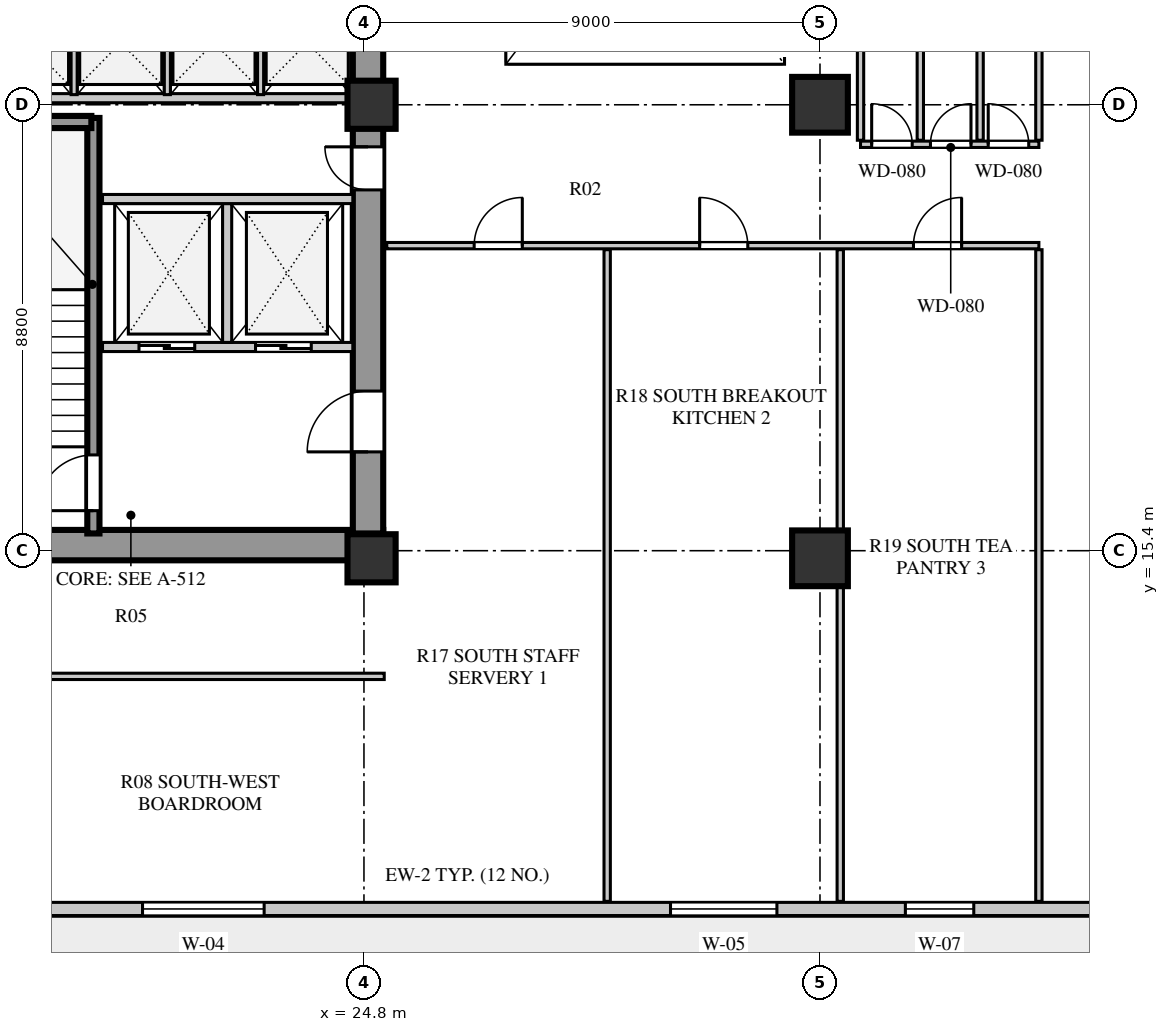
"""IFC4 building model, lengths in metres.
Left out: names, types, materials, properties, quantities, classifications, styles, units other than length and angle.
Written with IfcOpenShell. Run it as: python <this file> out.ifc"""

import sys

from ifc_helpers import new_model, si_unit, direction, frame, frame_2d, origin, origin_2d, place, context, subcontext, project, spatial, rectangle, extrude, element, fill, save


model = new_model("IFC4")
c1 = context("Model", 3, precision=1e-05, world=origin(), true_north=direction((0.0, 1.0)))
c2 = subcontext(c1, "Body", "Model", "MODEL_VIEW")
j1 = project(units=[si_unit("LENGTHUNIT", "METRE"), si_unit("PLANEANGLEUNIT", "RADIAN")], contexts=[c1])
p1 = place(None, origin())
s1 = spatial("IfcSite", under=j1, at=p1, CompositionType="ELEMENT")
p2 = place(p1, origin())
s2 = spatial("IfcBuilding", under=s1, at=p2, CompositionType="ELEMENT")
p3 = place(p2, frame((0.0, 0.0, 90.0)))
s3 = spatial("IfcBuildingStorey", under=s2, at=p3, CompositionType="ELEMENT", Elevation=90.0)
p4 = place(p3, frame((15.3, 15.51, 0.0), z_axis=(0.0, 0.0, 1.0), x_axis=(1.0, 0.0, 0.0)))
e1 = element("IfcWall", 1, at=p4, inside=s3, PredefinedType="SHEAR", context=c2, shape_type="SweptSolid", body=[
    extrude(rectangle(XDim=9.88, YDim=0.6, at=frame_2d((4.94, 0.0))), origin(), (0.0, 0.0, 1.0), 3.7),
])
p5 = place(p3, frame((24.88, 15.74, 0.0), z_axis=(0.0, 0.0, 1.0), x_axis=(0.0, 1.0, 0.0)))
e2 = element("IfcWall", 2, at=p5, inside=s3, PredefinedType="SHEAR", context=c2, shape_type="SweptSolid", body=[
    extrude(rectangle(XDim=25.76, YDim=0.6, at=frame_2d((12.88, 0.0))), origin(), (0.0, 0.0, 1.0), 3.7),
])
p6 = place(p5, frame((1.61, 0.0, 0.0)))
e3 = element("IfcOpeningElement", 3, at=p6, cuts=e2, PredefinedType="OPENING", context=c2, shape_type="SweptSolid", body=[
    extrude(rectangle(XDim=1.2, YDim=2.1, at=frame_2d((0.6, 1.05))), frame((0.0, 0.31, 0.0), z_axis=(0.0, -1.0, 0.0), x_axis=(1.0, 0.0, 0.0)), (0.0, 0.0, 1.0), 0.62),
])
p7 = place(p5, frame((6.78, 0.0, 0.0)))
e4 = element("IfcOpeningElement", 4, at=p7, cuts=e2, PredefinedType="OPENING", context=c2, shape_type="SweptSolid", body=[
    extrude(rectangle(XDim=0.85, YDim=2.06, at=frame_2d((0.425, 1.03))), frame((0.0, 0.31, 0.0), z_axis=(0.0, -1.0, 0.0), x_axis=(1.0, 0.0, 0.0)), (0.0, 0.0, 1.0), 0.62),
])
p8 = place(p5, frame((12.11, 0.0, 0.0)))
e5 = element("IfcOpeningElement", 5, at=p8, cuts=e2, PredefinedType="OPENING", context=c2, shape_type="SweptSolid", body=[
    extrude(rectangle(XDim=1.5, YDim=2.12, at=frame_2d((0.75, 1.06))), frame((0.0, 0.31, 0.0), z_axis=(0.0, -1.0, 0.0), x_axis=(1.0, 0.0, 0.0)), (0.0, 0.0, 1.0), 0.62),
])
p9 = place(p5, frame((20.11, 0.0, 0.0)))
e6 = element("IfcOpeningElement", 6, at=p9, cuts=e2, PredefinedType="OPENING", context=c2, shape_type="SweptSolid", body=[
    extrude(rectangle(XDim=1.2, YDim=2.12, at=frame_2d((0.6, 1.06))), frame((0.0, 0.31, 0.0), z_axis=(0.0, -1.0, 0.0), x_axis=(1.0, 0.0, 0.0)), (0.0, 0.0, 1.0), 0.62),
])
p10 = place(p5, frame((24.01, 0.0, 0.0)))
e7 = element("IfcOpeningElement", 7, at=p10, cuts=e2, PredefinedType="OPENING", context=c2, shape_type="SweptSolid", body=[
    extrude(rectangle(XDim=0.95, YDim=2.1, at=frame_2d((0.475, 1.05))), frame((0.0, 0.31, 0.0), z_axis=(0.0, -1.0, 0.0), x_axis=(1.0, 0.0, 0.0)), (0.0, 0.0, 1.0), 0.62),
])
for number, where, z_axis, x_axis in (
    (8, (24.95, 15.25, 0.0), (0.0, 0.0, 1.0), (1.0, 0.0, 0.0)),
    (9, (24.95, 24.2, 0.0), (0.0, 0.0, 1.0), (1.0, 0.0, 0.0)),
):
    element("IfcColumn", number, at=place(p3, frame(where, z_axis=z_axis, x_axis=x_axis)), inside=s3, PredefinedType="COLUMN", context=c2, shape_type="SweptSolid", body=[
        extrude(rectangle(XDim=0.95, YDim=0.95, at=origin_2d()), origin(), (0.0, 0.0, 1.0), 3.7),
    ])
for number, where, z_axis, x_axis in (
    (10, (33.8, 15.25, 0.0), (0.0, 0.0, 1.0), (1.0, 0.0, 0.0)),
    (11, (33.8, 24.2, 0.0), (0.0, 0.0, 1.0), (1.0, 0.0, 0.0)),
):
    element("IfcColumn", number, at=place(p3, frame(where, z_axis=z_axis, x_axis=x_axis)), inside=s3, PredefinedType="COLUMN", context=c2, shape_type="SweptSolid", body=[
        extrude(rectangle(XDim=1.1, YDim=1.1, at=origin_2d()), origin(), (0.0, 0.0, 1.0), 3.7),
    ])
p11 = place(p3, frame((12.0, 8.33, 0.0), z_axis=(0.0, 0.0, 1.0), x_axis=(1.0, 0.0, 0.0)))
e12 = element("IfcWall", 12, at=p11, inside=s3, PredefinedType="SOLIDWALL", context=c2, shape_type="SweptSolid", body=[
    extrude(rectangle(XDim=34.6, YDim=0.26, at=frame_2d((17.3, 0.0))), origin(), (0.0, 0.0, 1.0), 3.7),
])
p12 = place(p11, frame((0.95, 0.0, 0.0)))
e13 = element("IfcOpeningElement", 13, at=p12, cuts=e12, PredefinedType="OPENING", context=c2, shape_type="SweptSolid", body=[
    extrude(rectangle(XDim=1.0, YDim=2.05, at=frame_2d((0.5, 1.025))), frame((0.0, 0.14, 0.0), z_axis=(0.0, -1.0, 0.0), x_axis=(1.0, 0.0, 0.0)), (0.0, 0.0, 1.0), 0.28),
])
p13 = place(p11, frame((8.43, 0.0, 0.8)))
e14 = element("IfcOpeningElement", 14, at=p13, cuts=e12, PredefinedType="OPENING", context=c2, shape_type="SweptSolid", body=[
    extrude(rectangle(XDim=2.4, YDim=2.05, at=frame_2d((1.2, 1.025))), frame((0.0, 0.14, 0.0), z_axis=(0.0, -1.0, 0.0), x_axis=(1.0, 0.0, 0.0)), (0.0, 0.0, 1.0), 0.28),
])
p14 = place(p11, frame((18.85, 0.0, 0.8)))
e15 = element("IfcOpeningElement", 15, at=p14, cuts=e12, PredefinedType="OPENING", context=c2, shape_type="SweptSolid", body=[
    extrude(rectangle(XDim=2.1, YDim=1.95, at=frame_2d((1.05, 0.975))), frame((0.0, 0.14, 0.0), z_axis=(0.0, -1.0, 0.0), x_axis=(1.0, 0.0, 0.0)), (0.0, 0.0, 1.0), 0.28),
])
p15 = place(p11, frame((23.485, 0.0, 0.8)))
e16 = element("IfcOpeningElement", 16, at=p15, cuts=e12, PredefinedType="OPENING", context=c2, shape_type="SweptSolid", body=[
    extrude(rectangle(XDim=1.35, YDim=1.9, at=frame_2d((0.675, 0.95))), frame((0.0, 0.14, 0.0), z_axis=(0.0, -1.0, 0.0), x_axis=(1.0, 0.0, 0.0)), (0.0, 0.0, 1.0), 0.28),
])
p16 = place(p11, frame((29.48, 0.0, 0.8)))
e17 = element("IfcOpeningElement", 17, at=p16, cuts=e12, PredefinedType="OPENING", context=c2, shape_type="SweptSolid", body=[
    extrude(rectangle(XDim=1.65, YDim=1.95, at=frame_2d((0.825, 0.975))), frame((0.0, 0.14, 0.0), z_axis=(0.0, -1.0, 0.0), x_axis=(1.0, 0.0, 0.0)), (0.0, 0.0, 1.0), 0.28),
])
p17 = place(p3, frame((19.46, 15.74, 0.0), z_axis=(0.0, 0.0, 1.0), x_axis=(0.0, 1.0, 0.0)))
e18 = element("IfcWall", 18, at=p17, inside=s3, PredefinedType="SHEAR", context=c2, shape_type="SweptSolid", body=[
    extrude(rectangle(XDim=8.2, YDim=0.24, at=frame_2d((4.1, 0.0))), origin(), (0.0, 0.0, 1.0), 4.0),
])
p18 = place(p17, frame((0.45, 0.0, 0.0)))
e19 = element("IfcOpeningElement", 19, at=p18, cuts=e18, PredefinedType="OPENING", context=c2, shape_type="SweptSolid", body=[
    extrude(rectangle(XDim=1.1, YDim=2.1, at=frame_2d((0.55, 1.05))), frame((0.0, 0.13, 0.0), z_axis=(0.0, -1.0, 0.0), x_axis=(1.0, 0.0, 0.0)), (0.0, 0.0, 1.0), 0.26),
])
p19 = place(p3, frame((15.9, 23.86, 0.0), z_axis=(0.0, 0.0, 1.0), x_axis=(1.0, 0.0, 0.0)))
e20 = element("IfcWall", 20, at=p19, inside=s3, PredefinedType="SHEAR", context=c2, shape_type="SweptSolid", body=[
    extrude(rectangle(XDim=3.52, YDim=0.24, at=frame_2d((1.76, 0.0))), origin(), (0.0, 0.0, 1.0), 4.0),
])
p20 = place(p3, frame((19.64, 19.42, 0.0), z_axis=(0.0, 0.0, 1.0), x_axis=(1.0, 0.0, 0.0)))
e21 = element("IfcWall", 21, at=p20, inside=s3, PredefinedType="SOLIDWALL", context=c2, shape_type="SweptSolid", body=[
    extrude(rectangle(XDim=4.94, YDim=0.18, at=frame_2d((2.47, 0.0))), origin(), (0.0, 0.0, 1.0), 3.7),
])
p21 = place(p20, frame((0.72, 0.0, 0.0)))
e22 = element("IfcOpeningElement", 22, at=p21, cuts=e21, PredefinedType="OPENING", context=c2, shape_type="SweptSolid", body=[
    extrude(rectangle(XDim=1.1, YDim=2.1, at=frame_2d((0.55, 1.05))), frame((0.0, 0.1, 0.0), z_axis=(0.0, -1.0, 0.0), x_axis=(1.0, 0.0, 0.0)), (0.0, 0.0, 1.0), 0.2),
])
p22 = place(p20, frame((3.02, 0.0, 0.0)))
e23 = element("IfcOpeningElement", 23, at=p22, cuts=e21, PredefinedType="OPENING", context=c2, shape_type="SweptSolid", body=[
    extrude(rectangle(XDim=1.1, YDim=2.1, at=frame_2d((0.55, 1.05))), frame((0.0, 0.1, 0.0), z_axis=(0.0, -1.0, 0.0), x_axis=(1.0, 0.0, 0.0)), (0.0, 0.0, 1.0), 0.2),
])
p23 = place(p3, frame((22.1, 19.51, 0.0), z_axis=(0.0, 0.0, 1.0), x_axis=(0.0, 1.0, 0.0)))
e24 = element("IfcWall", 24, at=p23, inside=s3, PredefinedType="SOLIDWALL", context=c2, shape_type="SweptSolid", body=[
    extrude(rectangle(XDim=2.74, YDim=0.18, at=frame_2d((1.37, 0.0))), origin(), (0.0, 0.0, 1.0), 3.7),
])
p24 = place(p3, frame((19.64, 22.34, 0.0), z_axis=(0.0, 0.0, 1.0), x_axis=(1.0, 0.0, 0.0)))
e25 = element("IfcWall", 25, at=p24, inside=s3, PredefinedType="SOLIDWALL", context=c2, shape_type="SweptSolid", body=[
    extrude(rectangle(XDim=4.94, YDim=0.18, at=frame_2d((2.47, 0.0))), origin(), (0.0, 0.0, 1.0), 3.7),
])
p25 = place(p3, frame((15.9, 24.33, 0.0), z_axis=(0.0, 0.0, 1.0), x_axis=(1.0, 0.0, 0.0)))
e26 = element("IfcWall", 26, at=p25, inside=s3, PredefinedType="SOLIDWALL", context=c2, shape_type="SweptSolid", body=[
    extrude(rectangle(XDim=8.68, YDim=0.18, at=frame_2d((4.34, 0.0))), origin(), (0.0, 0.0, 1.0), 3.0),
])
for number, where, z_axis, x_axis in (
    (27, (19.08, 24.4, 0.0), (0.0, 0.0, 1.0), (0.0, 1.0, 0.0)),
    (28, (20.92, 24.4, 0.0), (0.0, 0.0, 1.0), (0.0, 1.0, 0.0)),
    (29, (22.76, 24.4, 0.0), (0.0, 0.0, 1.0), (0.0, 1.0, 0.0)),
):
    element("IfcWall", number, at=place(p3, frame(where, z_axis=z_axis, x_axis=x_axis)), inside=s3, PredefinedType="PARTITIONING", context=c2, shape_type="SweptSolid", body=[
        extrude(rectangle(XDim=2.05, YDim=0.12, at=frame_2d((1.025, 0.0))), origin(), (0.0, 0.0, 1.0), 3.7),
    ])
p26 = place(p3, frame((25.25, 21.42, 0.0), z_axis=(0.0, 0.0, 1.0), x_axis=(1.0, 0.0, 0.0)))
e30 = element("IfcWall", 30, at=p26, inside=s3, PredefinedType="PLUMBINGWALL", context=c2, shape_type="SweptSolid", body=[
    extrude(rectangle(XDim=12.87, YDim=0.125, at=frame_2d((6.435, 0.0))), origin(), (0.0, 0.0, 1.0), 3.3),
])
p27 = place(p26, frame((1.725, 0.0, 0.0)))
e31 = element("IfcOpeningElement", 31, at=p27, cuts=e30, PredefinedType="OPENING", context=c2, shape_type="SweptSolid", body=[
    extrude(rectangle(XDim=0.95, YDim=2.08, at=frame_2d((0.475, 1.04))), frame((0.0, 0.073, 0.0), z_axis=(0.0, -1.0, 0.0), x_axis=(1.0, 0.0, 0.0)), (0.0, 0.0, 1.0), 0.145),
])
p28 = place(p26, frame((6.175, 0.0, 0.0)))
e32 = element("IfcOpeningElement", 32, at=p28, cuts=e30, PredefinedType="OPENING", context=c2, shape_type="SweptSolid", body=[
    extrude(rectangle(XDim=0.95, YDim=2.08, at=frame_2d((0.475, 1.04))), frame((0.0, 0.073, 0.0), z_axis=(0.0, -1.0, 0.0), x_axis=(1.0, 0.0, 0.0)), (0.0, 0.0, 1.0), 0.145),
])
p29 = place(p26, frame((10.395, 0.0, 0.0)))
e33 = element("IfcOpeningElement", 33, at=p29, cuts=e30, PredefinedType="OPENING", context=c2, shape_type="SweptSolid", body=[
    extrude(rectangle(XDim=0.95, YDim=2.08, at=frame_2d((0.475, 1.04))), frame((0.0, 0.073, 0.0), z_axis=(0.0, -1.0, 0.0), x_axis=(1.0, 0.0, 0.0)), (0.0, 0.0, 1.0), 0.145),
])
p30 = place(p3, frame((38.12, 8.48, 0.0), z_axis=(0.0, 0.0, 1.0), x_axis=(0.0, 1.0, 0.0)))
e34 = element("IfcWall", 34, at=p30, inside=s3, PredefinedType="PLUMBINGWALL", context=c2, shape_type="SweptSolid", body=[
    extrude(rectangle(XDim=12.86, YDim=0.125, at=frame_2d((6.43, 0.0))), origin(), (0.0, 0.0, 1.0), 3.7),
])
p31 = place(p3, frame((34.6, 23.42, 0.0), z_axis=(0.0, 0.0, 1.0), x_axis=(1.0, 0.0, 0.0)))
e35 = element("IfcWall", 35, at=p31, inside=s3, PredefinedType="PLUMBINGWALL", context=c2, shape_type="SweptSolid", body=[
    extrude(rectangle(XDim=3.52, YDim=0.125, at=frame_2d((1.76, 0.0))), origin(), (0.0, 0.0, 1.0), 3.7),
])
p32 = place(p31, frame((0.22, 0.0, 0.0)))
e36 = element("IfcOpeningElement", 36, at=p32, cuts=e35, PredefinedType="OPENING", context=c2, shape_type="SweptSolid", body=[
    extrude(rectangle(XDim=0.8, YDim=2.05, at=frame_2d((0.4, 1.025))), frame((0.0, 0.073, 0.0), z_axis=(0.0, -1.0, 0.0), x_axis=(1.0, 0.0, 0.0)), (0.0, 0.0, 1.0), 0.145),
])
p33 = place(p31, frame((1.38, 0.0, 0.0)))
e37 = element("IfcOpeningElement", 37, at=p33, cuts=e35, PredefinedType="OPENING", context=c2, shape_type="SweptSolid", body=[
    extrude(rectangle(XDim=0.8, YDim=2.05, at=frame_2d((0.4, 1.025))), frame((0.0, 0.073, 0.0), z_axis=(0.0, -1.0, 0.0), x_axis=(1.0, 0.0, 0.0)), (0.0, 0.0, 1.0), 0.145),
])
p34 = place(p31, frame((2.52, 0.0, 0.0)))
e38 = element("IfcOpeningElement", 38, at=p34, cuts=e35, PredefinedType="OPENING", context=c2, shape_type="SweptSolid", body=[
    extrude(rectangle(XDim=0.8, YDim=2.05, at=frame_2d((0.4, 1.025))), frame((0.0, 0.073, 0.0), z_axis=(0.0, -1.0, 0.0), x_axis=(1.0, 0.0, 0.0)), (0.0, 0.0, 1.0), 0.145),
])
p35 = place(p3, frame((10.5, 12.92, 0.0), z_axis=(0.0, 0.0, 1.0), x_axis=(1.0, 0.0, 0.0)))
e39 = element("IfcWall", 39, at=p35, inside=s3, PredefinedType="PLUMBINGWALL", context=c2, shape_type="SweptSolid", body=[
    extrude(rectangle(XDim=14.7, YDim=0.125, at=frame_2d((7.35, 0.0))), origin(), (0.0, 0.0, 1.0), 3.7),
])
p36 = place(p35, frame((6.2, 0.0, 0.0)))
e40 = element("IfcOpeningElement", 40, at=p36, cuts=e39, PredefinedType="OPENING", context=c2, shape_type="SweptSolid", body=[
    extrude(rectangle(XDim=1.0, YDim=2.08, at=frame_2d((0.5, 1.04))), frame((0.0, 0.073, 0.0), z_axis=(0.0, -1.0, 0.0), x_axis=(1.0, 0.0, 0.0)), (0.0, 0.0, 1.0), 0.145),
])
for number, where, z_axis, x_axis in (
    (41, (34.6, 23.5, 0.0), (0.0, 0.0, 1.0), (0.0, 1.0, 0.0)),
    (42, (38.12, 23.5, 0.0), (0.0, 0.0, 1.0), (0.0, 1.0, 0.0)),
    (43, (35.78, 23.5, 0.0), (0.0, 0.0, 1.0), (0.0, 1.0, 0.0)),
    (44, (36.96, 23.5, 0.0), (0.0, 0.0, 1.0), (0.0, 1.0, 0.0)),
):
    element("IfcWall", number, at=place(p3, frame(where, z_axis=z_axis, x_axis=x_axis)), inside=s3, PredefinedType="PLUMBINGWALL", context=c2, shape_type="SweptSolid", body=[
        extrude(rectangle(XDim=3.62, YDim=0.125, at=frame_2d((1.81, 0.0))), origin(), (0.0, 0.0, 1.0), 3.7),
    ])
for number, where, z_axis, x_axis in (
    (45, (29.6, 8.48, 0.0), (0.0, 0.0, 1.0), (0.0, 1.0, 0.0)),
    (46, (34.2, 8.48, 0.0), (0.0, 0.0, 1.0), (0.0, 1.0, 0.0)),
):
    element("IfcWall", number, at=place(p3, frame(where, z_axis=z_axis, x_axis=x_axis)), inside=s3, PredefinedType="PLUMBINGWALL", context=c2, shape_type="SweptSolid", body=[
        extrude(rectangle(XDim=12.86, YDim=0.125, at=frame_2d((6.43, 0.0))), origin(), (0.0, 0.0, 1.0), 3.7),
    ])
p37 = place(p13, origin())
e47 = element("IfcWindow", 47, at=p37, inside=s3, PartitioningType="SINGLE_PANEL", PredefinedType="WINDOW", context=c2, shape_type="SweptSolid", body=[
    extrude(rectangle(XDim=2.4, YDim=2.05, at=frame_2d((1.2, 1.025))), frame((0.0, 0.03, 0.0), z_axis=(0.0, -1.0, 0.0), x_axis=(1.0, 0.0, 0.0)), (0.0, 0.0, 1.0), 0.06),
])
fill(e14, e47)
p38 = place(p14, origin())
e48 = element("IfcWindow", 48, at=p38, inside=s3, PartitioningType="SINGLE_PANEL", PredefinedType="WINDOW", context=c2, shape_type="SweptSolid", body=[
    extrude(rectangle(XDim=2.1, YDim=1.95, at=frame_2d((1.05, 0.975))), frame((0.0, 0.03, 0.0), z_axis=(0.0, -1.0, 0.0), x_axis=(1.0, 0.0, 0.0)), (0.0, 0.0, 1.0), 0.06),
])
fill(e15, e48)
p39 = place(p15, origin())
e49 = element("IfcWindow", 49, at=p39, inside=s3, PartitioningType="SINGLE_PANEL", PredefinedType="WINDOW", context=c2, shape_type="SweptSolid", body=[
    extrude(rectangle(XDim=1.35, YDim=1.9, at=frame_2d((0.675, 0.95))), frame((0.0, 0.03, 0.0), z_axis=(0.0, -1.0, 0.0), x_axis=(1.0, 0.0, 0.0)), (0.0, 0.0, 1.0), 0.06),
])
fill(e16, e49)
p40 = place(p18, origin())
e50 = element("IfcDoor", 50, at=p40, inside=s3, OperationType="SINGLE_SWING_LEFT", PredefinedType="DOOR", context=c2, shape_type="SweptSolid", body=[
    extrude(rectangle(XDim=1.1, YDim=2.1, at=frame_2d((0.55, 1.05))), frame((0.0, 0.025, 0.0), z_axis=(0.0, -1.0, 0.0), x_axis=(1.0, 0.0, 0.0)), (0.0, 0.0, 1.0), 0.05),
])
fill(e19, e50)
p41 = place(p21, origin())
e51 = element("IfcDoor", 51, at=p41, inside=s3, OperationType="DOUBLE_DOOR_SLIDING", PredefinedType="DOOR", context=c2, shape_type="SweptSolid", body=[
    extrude(rectangle(XDim=1.1, YDim=2.1, at=frame_2d((0.55, 1.05))), frame((0.0, 0.025, 0.0), z_axis=(0.0, -1.0, 0.0), x_axis=(1.0, 0.0, 0.0)), (0.0, 0.0, 1.0), 0.05),
])
fill(e22, e51)
p42 = place(p22, origin())
e52 = element("IfcDoor", 52, at=p42, inside=s3, OperationType="DOUBLE_DOOR_SLIDING", PredefinedType="DOOR", context=c2, shape_type="SweptSolid", body=[
    extrude(rectangle(XDim=1.1, YDim=2.1, at=frame_2d((0.55, 1.05))), frame((0.0, 0.025, 0.0), z_axis=(0.0, -1.0, 0.0), x_axis=(1.0, 0.0, 0.0)), (0.0, 0.0, 1.0), 0.05),
])
fill(e23, e52)
p43 = place(p6, frame((1.2, 0.0, 0.0), z_axis=(0.0, 0.0, 1.0), x_axis=(-1.0, 0.0, 0.0)))
e53 = element("IfcDoor", 53, at=p43, inside=s3, OperationType="SINGLE_SWING_RIGHT", PredefinedType="DOOR", context=c2, shape_type="SweptSolid", body=[
    extrude(rectangle(XDim=1.2, YDim=2.1, at=frame_2d((0.6, 1.05))), frame((0.0, 0.025, 0.0), z_axis=(0.0, -1.0, 0.0), x_axis=(1.0, 0.0, 0.0)), (0.0, 0.0, 1.0), 0.05),
])
fill(e3, e53)
p44 = place(p7, frame((0.85, 0.0, 0.0), z_axis=(0.0, 0.0, 1.0), x_axis=(-1.0, 0.0, 0.0)))
e54 = element("IfcDoor", 54, at=p44, inside=s3, OperationType="SINGLE_SWING_LEFT", PredefinedType="DOOR", context=c2, shape_type="SweptSolid", body=[
    extrude(rectangle(XDim=0.85, YDim=2.06, at=frame_2d((0.425, 1.03))), frame((0.0, 0.025, 0.0), z_axis=(0.0, -1.0, 0.0), x_axis=(1.0, 0.0, 0.0)), (0.0, 0.0, 1.0), 0.05),
])
fill(e4, e54)
p45 = place(p32, origin())
e55 = element("IfcDoor", 55, at=p45, inside=s3, OperationType="SINGLE_SWING_LEFT", PredefinedType="DOOR", context=c2, shape_type="SweptSolid", body=[
    extrude(rectangle(XDim=0.8, YDim=2.05, at=frame_2d((0.4, 1.025))), frame((0.0, 0.025, 0.0), z_axis=(0.0, -1.0, 0.0), x_axis=(1.0, 0.0, 0.0)), (0.0, 0.0, 1.0), 0.05),
])
fill(e36, e55)
p46 = place(p33, origin())
e56 = element("IfcDoor", 56, at=p46, inside=s3, OperationType="SINGLE_SWING_RIGHT", PredefinedType="DOOR", context=c2, shape_type="SweptSolid", body=[
    extrude(rectangle(XDim=0.8, YDim=2.05, at=frame_2d((0.4, 1.025))), frame((0.0, 0.025, 0.0), z_axis=(0.0, -1.0, 0.0), x_axis=(1.0, 0.0, 0.0)), (0.0, 0.0, 1.0), 0.05),
])
fill(e37, e56)
p47 = place(p34, origin())
e57 = element("IfcDoor", 57, at=p47, inside=s3, OperationType="SINGLE_SWING_LEFT", PredefinedType="DOOR", context=c2, shape_type="SweptSolid", body=[
    extrude(rectangle(XDim=0.8, YDim=2.05, at=frame_2d((0.4, 1.025))), frame((0.0, 0.025, 0.0), z_axis=(0.0, -1.0, 0.0), x_axis=(1.0, 0.0, 0.0)), (0.0, 0.0, 1.0), 0.05),
])
fill(e38, e57)
p48 = place(p27, frame((0.95, 0.0, 0.0), z_axis=(0.0, 0.0, 1.0), x_axis=(-1.0, 0.0, 0.0)))
e58 = element("IfcDoor", 58, at=p48, inside=s3, OperationType="SINGLE_SWING_LEFT", PredefinedType="DOOR", context=c2, shape_type="SweptSolid", body=[
    extrude(rectangle(XDim=0.95, YDim=2.08, at=frame_2d((0.475, 1.04))), frame((0.0, 0.025, 0.0), z_axis=(0.0, -1.0, 0.0), x_axis=(1.0, 0.0, 0.0)), (0.0, 0.0, 1.0), 0.05),
])
fill(e31, e58)
p49 = place(p28, frame((0.95, 0.0, 0.0), z_axis=(0.0, 0.0, 1.0), x_axis=(-1.0, 0.0, 0.0)))
e59 = element("IfcDoor", 59, at=p49, inside=s3, OperationType="SINGLE_SWING_RIGHT", PredefinedType="DOOR", context=c2, shape_type="SweptSolid", body=[
    extrude(rectangle(XDim=0.95, YDim=2.08, at=frame_2d((0.475, 1.04))), frame((0.0, 0.025, 0.0), z_axis=(0.0, -1.0, 0.0), x_axis=(1.0, 0.0, 0.0)), (0.0, 0.0, 1.0), 0.05),
])
fill(e32, e59)
p50 = place(p29, frame((0.95, 0.0, 0.0), z_axis=(0.0, 0.0, 1.0), x_axis=(-1.0, 0.0, 0.0)))
e60 = element("IfcDoor", 60, at=p50, inside=s3, OperationType="SINGLE_SWING_LEFT", PredefinedType="DOOR", context=c2, shape_type="SweptSolid", body=[
    extrude(rectangle(XDim=0.95, YDim=2.08, at=frame_2d((0.475, 1.04))), frame((0.0, 0.025, 0.0), z_axis=(0.0, -1.0, 0.0), x_axis=(1.0, 0.0, 0.0)), (0.0, 0.0, 1.0), 0.05),
])
fill(e33, e60)
save(model, sys.argv[1])
